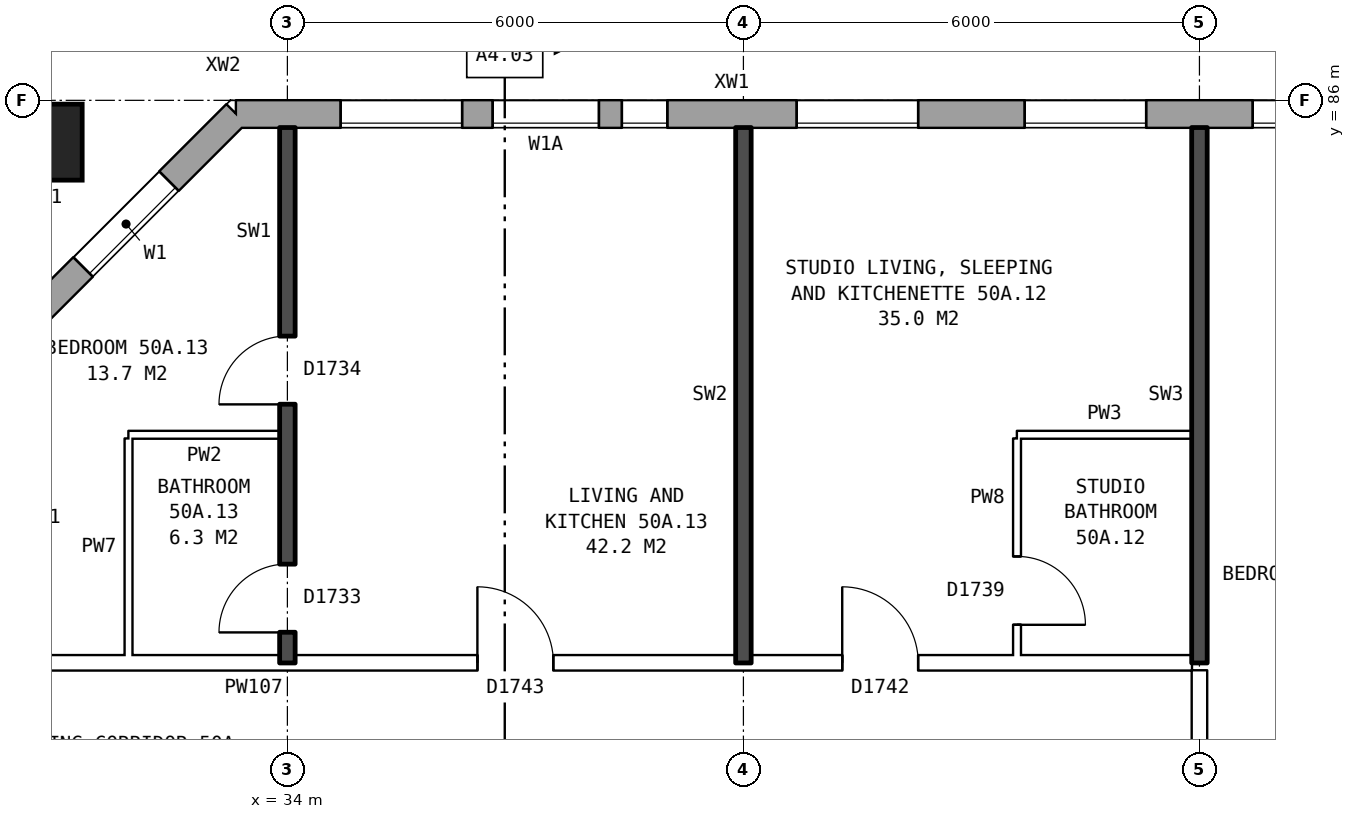
"""IFC4 building model, lengths in metres.
Left out: names, types, materials, properties, quantities, classifications, styles, units other than length and angle.
Written with IfcOpenShell. Run it as: python <this file> out.ifc"""

import sys

from ifc_helpers import new_model, si_unit, direction, frame, frame_2d, origin, origin_2d, place, context, subcontext, project, spatial, rectangle, hollow_rectangle, extrude, element, fill, save


model = new_model("IFC4")
c1 = context("Model", 3, precision=1e-05, world=origin(), true_north=direction((0.0, 1.0)))
c2 = subcontext(c1, "Body", "Model", "MODEL_VIEW")
j1 = project(units=[si_unit("LENGTHUNIT", "METRE"), si_unit("PLANEANGLEUNIT", "RADIAN")], contexts=[c1])
p1 = place(None, origin())
s1 = spatial("IfcSite", under=j1, at=p1, CompositionType="ELEMENT")
p2 = place(p1, origin())
s2 = spatial("IfcBuilding", under=s1, at=p2, CompositionType="ELEMENT")
p3 = place(p2, frame((0.0, 0.0, 178.9)))
s3 = spatial("IfcBuildingStorey", under=s2, at=p3, CompositionType="ELEMENT", Elevation=178.9)
p4 = place(p3, frame((30.8, 85.45, 0.0), z_axis=(0.0, 0.0, 1.0), x_axis=(1.0, 0.0, 0.0)))
e1 = element("IfcColumn", 1, at=p4, inside=s3, PredefinedType="COLUMN", context=c2, shape_type="SweptSolid", body=[
    extrude(hollow_rectangle(XDim=1.0, YDim=1.0, WallThickness=0.055, at=origin_2d()), origin(), (0.0, 0.0, 1.0), 3.1),
])
p5 = place(p3, frame((72.925, 85.82, 0.0), z_axis=(0.0, 0.0, 1.0), x_axis=(-1.0, 0.0, 0.0)))
e2 = element("IfcWall", 2, at=p5, inside=s3, PredefinedType="STANDARD", context=c2, shape_type="SweptSolid", body=[
    extrude(rectangle(XDim=39.601, YDim=0.36, at=frame_2d((19.8, 0.0))), origin(), (0.0, 0.0, 1.0), 2.85),
])
p6 = place(p5, frame((0.625, 0.0, 0.8)))
e3 = element("IfcOpeningElement", 3, at=p6, cuts=e2, PredefinedType="OPENING", context=c2, shape_type="SweptSolid", body=[
    extrude(rectangle(XDim=1.6, YDim=1.8, at=frame_2d((0.8, 0.9))), frame((0.0, 0.19, 0.0), z_axis=(0.0, -1.0, 0.0), x_axis=(1.0, 0.0, 0.0)), (0.0, 0.0, 1.0), 0.38),
])
p7 = place(p5, frame((3.125, 0.0, 0.8)))
e4 = element("IfcOpeningElement", 4, at=p7, cuts=e2, PredefinedType="OPENING", context=c2, shape_type="SweptSolid", body=[
    extrude(rectangle(XDim=1.6, YDim=1.8, at=frame_2d((0.8, 0.9))), frame((0.0, 0.19, 0.0), z_axis=(0.0, -1.0, 0.0), x_axis=(1.0, 0.0, 0.0)), (0.0, 0.0, 1.0), 0.38),
])
p8 = place(p5, frame((5.025, 0.0, 1.7)))
e5 = element("IfcOpeningElement", 5, at=p8, cuts=e2, PredefinedType="OPENING", context=c2, shape_type="SweptSolid", body=[
    extrude(rectangle(XDim=0.6, YDim=0.9, at=frame_2d((0.3, 0.45))), frame((0.0, 0.19, 0.0), z_axis=(0.0, -1.0, 0.0), x_axis=(1.0, 0.0, 0.0)), (0.0, 0.0, 1.0), 0.38),
])
p9 = place(p5, frame((9.625, 0.0, 0.8)))
e6 = element("IfcOpeningElement", 6, at=p9, cuts=e2, PredefinedType="OPENING", context=c2, shape_type="SweptSolid", body=[
    extrude(rectangle(XDim=1.6, YDim=1.8, at=frame_2d((0.8, 0.9))), frame((0.0, 0.19, 0.0), z_axis=(0.0, -1.0, 0.0), x_axis=(1.0, 0.0, 0.0)), (0.0, 0.0, 1.0), 0.38),
])
p10 = place(p5, frame((12.625, 0.0, 0.8)))
e7 = element("IfcOpeningElement", 7, at=p10, cuts=e2, PredefinedType="OPENING", context=c2, shape_type="SweptSolid", body=[
    extrude(rectangle(XDim=1.6, YDim=1.8, at=frame_2d((0.8, 0.9))), frame((0.0, 0.19, 0.0), z_axis=(0.0, -1.0, 0.0), x_axis=(1.0, 0.0, 0.0)), (0.0, 0.0, 1.0), 0.38),
])
p11 = place(p5, frame((15.625, 0.0, 0.8)))
e8 = element("IfcOpeningElement", 8, at=p11, cuts=e2, PredefinedType="OPENING", context=c2, shape_type="SweptSolid", body=[
    extrude(rectangle(XDim=1.6, YDim=1.8, at=frame_2d((0.8, 0.9))), frame((0.0, 0.19, 0.0), z_axis=(0.0, -1.0, 0.0), x_axis=(1.0, 0.0, 0.0)), (0.0, 0.0, 1.0), 0.38),
])
p12 = place(p5, frame((18.625, 0.0, 0.8)))
e9 = element("IfcOpeningElement", 9, at=p12, cuts=e2, PredefinedType="OPENING", context=c2, shape_type="SweptSolid", body=[
    extrude(rectangle(XDim=1.6, YDim=1.8, at=frame_2d((0.8, 0.9))), frame((0.0, 0.19, 0.0), z_axis=(0.0, -1.0, 0.0), x_axis=(1.0, 0.0, 0.0)), (0.0, 0.0, 1.0), 0.38),
])
p13 = place(p5, frame((21.625, 0.0, 0.8)))
e10 = element("IfcOpeningElement", 10, at=p13, cuts=e2, PredefinedType="OPENING", context=c2, shape_type="SweptSolid", body=[
    extrude(rectangle(XDim=1.6, YDim=1.8, at=frame_2d((0.8, 0.9))), frame((0.0, 0.19, 0.0), z_axis=(0.0, -1.0, 0.0), x_axis=(1.0, 0.0, 0.0)), (0.0, 0.0, 1.0), 0.38),
])
p14 = place(p5, frame((24.625, 0.0, 0.8)))
e11 = element("IfcOpeningElement", 11, at=p14, cuts=e2, PredefinedType="OPENING", context=c2, shape_type="SweptSolid", body=[
    extrude(rectangle(XDim=1.6, YDim=1.8, at=frame_2d((0.8, 0.9))), frame((0.0, 0.19, 0.0), z_axis=(0.0, -1.0, 0.0), x_axis=(1.0, 0.0, 0.0)), (0.0, 0.0, 1.0), 0.38),
])
p15 = place(p5, frame((27.625, 0.0, 0.8)))
e12 = element("IfcOpeningElement", 12, at=p15, cuts=e2, PredefinedType="OPENING", context=c2, shape_type="SweptSolid", body=[
    extrude(rectangle(XDim=1.6, YDim=1.8, at=frame_2d((0.8, 0.9))), frame((0.0, 0.19, 0.0), z_axis=(0.0, -1.0, 0.0), x_axis=(1.0, 0.0, 0.0)), (0.0, 0.0, 1.0), 0.38),
])
p16 = place(p5, frame((30.625, 0.0, 0.8)))
e13 = element("IfcOpeningElement", 13, at=p16, cuts=e2, PredefinedType="OPENING", context=c2, shape_type="SweptSolid", body=[
    extrude(rectangle(XDim=1.6, YDim=1.8, at=frame_2d((0.8, 0.9))), frame((0.0, 0.19, 0.0), z_axis=(0.0, -1.0, 0.0), x_axis=(1.0, 0.0, 0.0)), (0.0, 0.0, 1.0), 0.38),
])
p17 = place(p5, frame((33.925, 0.0, 1.7)))
e14 = element("IfcOpeningElement", 14, at=p17, cuts=e2, PredefinedType="OPENING", context=c2, shape_type="SweptSolid", body=[
    extrude(rectangle(XDim=0.6, YDim=0.9, at=frame_2d((0.3, 0.45))), frame((0.0, 0.19, 0.0), z_axis=(0.0, -1.0, 0.0), x_axis=(1.0, 0.0, 0.0)), (0.0, 0.0, 1.0), 0.38),
])
p18 = place(p5, frame((36.625, 0.0, 0.8)))
e15 = element("IfcOpeningElement", 15, at=p18, cuts=e2, PredefinedType="OPENING", context=c2, shape_type="SweptSolid", body=[
    extrude(rectangle(XDim=1.6, YDim=1.8, at=frame_2d((0.8, 0.9))), frame((0.0, 0.19, 0.0), z_axis=(0.0, -1.0, 0.0), x_axis=(1.0, 0.0, 0.0)), (0.0, 0.0, 1.0), 0.38),
])
p19 = place(p5, frame((6.825, 0.0, 0.8)))
e16 = element("IfcOpeningElement", 16, at=p19, cuts=e2, PredefinedType="OPENING", context=c2, shape_type="SweptSolid", body=[
    extrude(rectangle(XDim=0.6, YDim=0.9, at=frame_2d((0.3, 0.45))), frame((0.0, 0.19, 0.0), z_axis=(0.0, -1.0, 0.0), x_axis=(1.0, 0.0, 0.0)), (0.0, 0.0, 1.0), 0.38),
])
p20 = place(p5, frame((7.725, 0.0, 0.8)))
e17 = element("IfcOpeningElement", 17, at=p20, cuts=e2, PredefinedType="OPENING", context=c2, shape_type="SweptSolid", body=[
    extrude(rectangle(XDim=1.0, YDim=1.8, at=frame_2d((0.5, 0.9))), frame((0.0, 0.19, 0.0), z_axis=(0.0, -1.0, 0.0), x_axis=(1.0, 0.0, 0.0)), (0.0, 0.0, 1.0), 0.38),
])
p21 = place(p5, frame((34.825, 0.0, 0.8)))
e18 = element("IfcOpeningElement", 18, at=p21, cuts=e2, PredefinedType="OPENING", context=c2, shape_type="SweptSolid", body=[
    extrude(rectangle(XDim=1.4, YDim=1.8, at=frame_2d((0.7, 0.9))), frame((0.0, 0.19, 0.0), z_axis=(0.0, -1.0, 0.0), x_axis=(1.0, 0.0, 0.0)), (0.0, 0.0, 1.0), 0.38),
])
p22 = place(p3, frame((33.325, 85.82, 0.0), z_axis=(0.0, 0.0, 1.0), x_axis=(-0.707106781187, -0.707106781187, 0.0)))
e19 = element("IfcWall", 19, at=p22, inside=s3, PredefinedType="STANDARD", context=c2, shape_type="SweptSolid", body=[
    extrude(rectangle(XDim=4.094, YDim=0.36, at=frame_2d((2.047, 0.0))), origin(), (0.0, 0.0, 1.0), 2.85),
])
p23 = place(p22, frame((1.247, 0.0, 0.8)))
e20 = element("IfcOpeningElement", 20, at=p23, cuts=e19, PredefinedType="OPENING", context=c2, shape_type="SweptSolid", body=[
    extrude(rectangle(XDim=1.6, YDim=1.8, at=frame_2d((0.8, 0.9))), frame((0.0, 0.19, 0.0), z_axis=(0.0, -1.0, 0.0), x_axis=(1.0, 0.0, 0.0)), (0.0, 0.0, 1.0), 0.38),
])
p24 = place(p3, frame((30.61, 78.6, 0.0), z_axis=(0.0, 0.0, 1.0), x_axis=(1.0, 0.0, 0.0)))
e21 = element("IfcWall", 21, at=p24, inside=s3, PredefinedType="PARTITIONING", context=c2, shape_type="SweptSolid", body=[
    extrude(rectangle(XDim=15.29, YDim=0.2, at=frame_2d((7.645, 0.0))), origin(), (0.0, 0.0, 1.0), 2.85),
])
p25 = place(p24, frame((10.69, 0.0, 0.0)))
e22 = element("IfcOpeningElement", 22, at=p25, cuts=e21, PredefinedType="OPENING", context=c2, shape_type="SweptSolid", body=[
    extrude(rectangle(XDim=1.0, YDim=2.1, at=frame_2d((0.5, 1.05))), frame((0.0, 0.11, 0.0), z_axis=(0.0, -1.0, 0.0), x_axis=(1.0, 0.0, 0.0)), (0.0, 0.0, 1.0), 0.22),
])
p26 = place(p24, frame((5.89, 0.0, 0.0)))
e23 = element("IfcOpeningElement", 23, at=p26, cuts=e21, PredefinedType="OPENING", context=c2, shape_type="SweptSolid", body=[
    extrude(rectangle(XDim=1.0, YDim=2.1, at=frame_2d((0.5, 1.05))), frame((0.0, 0.11, 0.0), z_axis=(0.0, -1.0, 0.0), x_axis=(1.0, 0.0, 0.0)), (0.0, 0.0, 1.0), 0.22),
])
p27 = place(p3, frame((31.91, 81.6, 0.0), z_axis=(0.0, 0.0, 1.0), x_axis=(1.0, 0.0, 0.0)))
e24 = element("IfcWall", 24, at=p27, inside=s3, PredefinedType="PARTITIONING", context=c2, shape_type="SweptSolid", body=[
    extrude(rectangle(XDim=1.99, YDim=0.1, at=frame_2d((0.995, 0.0))), origin(), (0.0, 0.0, 1.0), 2.85),
])
p28 = place(p3, frame((43.6, 81.6, 0.0), z_axis=(0.0, 0.0, 1.0), x_axis=(1.0, 0.0, 0.0)))
e25 = element("IfcWall", 25, at=p28, inside=s3, PredefinedType="PARTITIONING", context=c2, shape_type="SweptSolid", body=[
    extrude(rectangle(XDim=2.3, YDim=0.1, at=frame_2d((1.15, 0.0))), origin(), (0.0, 0.0, 1.0), 2.85),
])
p29 = place(p3, frame((31.91, 78.7, 0.0), z_axis=(0.0, 0.0, 1.0), x_axis=(0.0, 1.0, 0.0)))
e26 = element("IfcWall", 26, at=p29, inside=s3, PredefinedType="PARTITIONING", context=c2, shape_type="SweptSolid", body=[
    extrude(rectangle(XDim=2.85, YDim=0.1, at=frame_2d((1.425, 0.0))), origin(), (0.0, 0.0, 1.0), 2.85),
])
p30 = place(p3, frame((34.0, 78.6, 0.0), z_axis=(0.0, 0.0, 1.0), x_axis=(0.0, 1.0, 0.0)))
e27 = element("IfcWall", 27, at=p30, inside=s3, PredefinedType="SOLIDWALL", context=c2, shape_type="SweptSolid", body=[
    extrude(rectangle(XDim=7.04, YDim=0.2, at=frame_2d((3.52, 0.0))), origin(), (0.0, 0.0, 1.0), 2.85),
])
p31 = place(p30, frame((3.4, 0.0, 0.0)))
e28 = element("IfcOpeningElement", 28, at=p31, cuts=e27, PredefinedType="OPENING", context=c2, shape_type="SweptSolid", body=[
    extrude(rectangle(XDim=0.9, YDim=2.1, at=frame_2d((0.45, 1.05))), frame((0.0, 0.11, 0.0), z_axis=(0.0, -1.0, 0.0), x_axis=(1.0, 0.0, 0.0)), (0.0, 0.0, 1.0), 0.22),
])
p32 = place(p30, frame((0.4, 0.0, 0.0)))
e29 = element("IfcOpeningElement", 29, at=p32, cuts=e27, PredefinedType="OPENING", context=c2, shape_type="SweptSolid", body=[
    extrude(rectangle(XDim=0.9, YDim=2.1, at=frame_2d((0.45, 1.05))), frame((0.0, 0.11, 0.0), z_axis=(0.0, -1.0, 0.0), x_axis=(1.0, 0.0, 0.0)), (0.0, 0.0, 1.0), 0.22),
])
p33 = place(p3, frame((40.0, 78.6, 0.0), z_axis=(0.0, 0.0, 1.0), x_axis=(0.0, 1.0, 0.0)))
e30 = element("IfcWall", 30, at=p33, inside=s3, PredefinedType="SOLIDWALL", context=c2, shape_type="SweptSolid", body=[
    extrude(rectangle(XDim=7.04, YDim=0.2, at=frame_2d((3.52, 0.0))), origin(), (0.0, 0.0, 1.0), 2.85),
])
p34 = place(p3, frame((43.6, 78.7, 0.0), z_axis=(0.0, 0.0, 1.0), x_axis=(0.0, 1.0, 0.0)))
e31 = element("IfcWall", 31, at=p34, inside=s3, PredefinedType="PARTITIONING", context=c2, shape_type="SweptSolid", body=[
    extrude(rectangle(XDim=2.85, YDim=0.1, at=frame_2d((1.425, 0.0))), origin(), (0.0, 0.0, 1.0), 2.85),
])
p35 = place(p34, frame((0.4, 0.0, 0.0)))
e32 = element("IfcOpeningElement", 32, at=p35, cuts=e31, PredefinedType="OPENING", context=c2, shape_type="SweptSolid", body=[
    extrude(rectangle(XDim=0.9, YDim=2.1, at=frame_2d((0.45, 1.05))), frame((0.0, 0.06, 0.0), z_axis=(0.0, -1.0, 0.0), x_axis=(1.0, 0.0, 0.0)), (0.0, 0.0, 1.0), 0.12),
])
p36 = place(p3, frame((46.0, 76.3, 0.0), z_axis=(0.0, 0.0, 1.0), x_axis=(0.0, 1.0, 0.0)))
e33 = element("IfcWall", 33, at=p36, inside=s3, PredefinedType="PARTITIONING", context=c2, shape_type="SweptSolid", body=[
    extrude(rectangle(XDim=2.2, YDim=0.2, at=frame_2d((1.1, 0.0))), origin(), (0.0, 0.0, 1.0), 2.85),
])
p37 = place(p3, frame((46.0, 78.6, 0.0), z_axis=(0.0, 0.0, 1.0), x_axis=(0.0, 1.0, 0.0)))
e34 = element("IfcWall", 34, at=p37, inside=s3, PredefinedType="SOLIDWALL", context=c2, shape_type="SweptSolid", body=[
    extrude(rectangle(XDim=7.04, YDim=0.2, at=frame_2d((3.52, 0.0))), origin(), (0.0, 0.0, 1.0), 2.85),
])
p38 = place(p14, origin())
e35 = element("IfcWindow", 35, at=p38, inside=s3, PartitioningType="SINGLE_PANEL", PredefinedType="WINDOW", context=c2, shape_type="SweptSolid", body=[
    extrude(rectangle(XDim=1.6, YDim=1.8, at=frame_2d((0.8, 0.9))), frame((0.0, 0.15, 0.0), z_axis=(0.0, -1.0, 0.0), x_axis=(1.0, 0.0, 0.0)), (0.0, 0.0, 1.0), 0.06),
])
fill(e11, e35)
p39 = place(p15, origin())
e36 = element("IfcWindow", 36, at=p39, inside=s3, PartitioningType="SINGLE_PANEL", PredefinedType="WINDOW", context=c2, shape_type="SweptSolid", body=[
    extrude(rectangle(XDim=1.6, YDim=1.8, at=frame_2d((0.8, 0.9))), frame((0.0, 0.15, 0.0), z_axis=(0.0, -1.0, 0.0), x_axis=(1.0, 0.0, 0.0)), (0.0, 0.0, 1.0), 0.06),
])
fill(e12, e36)
p40 = place(p16, origin())
e37 = element("IfcWindow", 37, at=p40, inside=s3, PartitioningType="SINGLE_PANEL", PredefinedType="WINDOW", context=c2, shape_type="SweptSolid", body=[
    extrude(rectangle(XDim=1.6, YDim=1.8, at=frame_2d((0.8, 0.9))), frame((0.0, 0.15, 0.0), z_axis=(0.0, -1.0, 0.0), x_axis=(1.0, 0.0, 0.0)), (0.0, 0.0, 1.0), 0.06),
])
fill(e13, e37)
p41 = place(p17, origin())
e38 = element("IfcWindow", 38, at=p41, inside=s3, PartitioningType="SINGLE_PANEL", PredefinedType="WINDOW", context=c2, shape_type="SweptSolid", body=[
    extrude(rectangle(XDim=0.6, YDim=0.9, at=frame_2d((0.3, 0.45))), frame((0.0, 0.15, 0.0), z_axis=(0.0, -1.0, 0.0), x_axis=(1.0, 0.0, 0.0)), (0.0, 0.0, 1.0), 0.06),
])
fill(e14, e38)
p42 = place(p18, origin())
e39 = element("IfcWindow", 39, at=p42, inside=s3, PartitioningType="SINGLE_PANEL", PredefinedType="WINDOW", context=c2, shape_type="SweptSolid", body=[
    extrude(rectangle(XDim=1.6, YDim=1.8, at=frame_2d((0.8, 0.9))), frame((0.0, 0.15, 0.0), z_axis=(0.0, -1.0, 0.0), x_axis=(1.0, 0.0, 0.0)), (0.0, 0.0, 1.0), 0.06),
])
fill(e15, e39)
p43 = place(p23, origin())
e40 = element("IfcWindow", 40, at=p43, inside=s3, PartitioningType="SINGLE_PANEL", PredefinedType="WINDOW", context=c2, shape_type="SweptSolid", body=[
    extrude(rectangle(XDim=1.6, YDim=1.8, at=frame_2d((0.8, 0.9))), frame((0.0, 0.15, 0.0), z_axis=(0.0, -1.0, 0.0), x_axis=(1.0, 0.0, 0.0)), (0.0, 0.0, 1.0), 0.06),
])
fill(e20, e40)
p44 = place(p25, origin())
e41 = element("IfcDoor", 41, at=p44, inside=s3, OperationType="SINGLE_SWING_LEFT", PredefinedType="DOOR", context=c2, shape_type="SweptSolid", body=[
    extrude(rectangle(XDim=1.0, YDim=2.1, at=frame_2d((0.5, 1.05))), frame((0.0, 0.025, 0.0), z_axis=(0.0, -1.0, 0.0), x_axis=(1.0, 0.0, 0.0)), (0.0, 0.0, 1.0), 0.05),
])
fill(e22, e41)
p45 = place(p35, frame((0.9, 0.0, 0.0), z_axis=(0.0, 0.0, 1.0), x_axis=(-1.0, 0.0, 0.0)))
e42 = element("IfcDoor", 42, at=p45, inside=s3, OperationType="SINGLE_SWING_RIGHT", PredefinedType="DOOR", context=c2, shape_type="SweptSolid", body=[
    extrude(rectangle(XDim=0.9, YDim=2.1, at=frame_2d((0.45, 1.05))), frame((0.0, 0.025, 0.0), z_axis=(0.0, -1.0, 0.0), x_axis=(1.0, 0.0, 0.0)), (0.0, 0.0, 1.0), 0.05),
])
fill(e32, e42)
p46 = place(p31, origin())
e43 = element("IfcDoor", 43, at=p46, inside=s3, OperationType="SINGLE_SWING_LEFT", PredefinedType="DOOR", context=c2, shape_type="SweptSolid", body=[
    extrude(rectangle(XDim=0.9, YDim=2.1, at=frame_2d((0.45, 1.05))), frame((0.0, 0.025, 0.0), z_axis=(0.0, -1.0, 0.0), x_axis=(1.0, 0.0, 0.0)), (0.0, 0.0, 1.0), 0.05),
])
fill(e28, e43)
p47 = place(p26, origin())
e44 = element("IfcDoor", 44, at=p47, inside=s3, OperationType="SINGLE_SWING_LEFT", PredefinedType="DOOR", context=c2, shape_type="SweptSolid", body=[
    extrude(rectangle(XDim=1.0, YDim=2.1, at=frame_2d((0.5, 1.05))), frame((0.0, 0.025, 0.0), z_axis=(0.0, -1.0, 0.0), x_axis=(1.0, 0.0, 0.0)), (0.0, 0.0, 1.0), 0.05),
])
fill(e23, e44)
p48 = place(p32, origin())
e45 = element("IfcDoor", 45, at=p48, inside=s3, OperationType="SINGLE_SWING_LEFT", PredefinedType="DOOR", context=c2, shape_type="SweptSolid", body=[
    extrude(rectangle(XDim=0.9, YDim=2.1, at=frame_2d((0.45, 1.05))), frame((0.0, 0.025, 0.0), z_axis=(0.0, -1.0, 0.0), x_axis=(1.0, 0.0, 0.0)), (0.0, 0.0, 1.0), 0.05),
])
fill(e29, e45)
p49 = place(p21, origin())
e46 = element("IfcWindow", 46, at=p49, inside=s3, PartitioningType="SINGLE_PANEL", PredefinedType="WINDOW", context=c2, shape_type="SweptSolid", body=[
    extrude(rectangle(XDim=1.4, YDim=1.8, at=frame_2d((0.7, 0.9))), frame((0.0, 0.15, 0.0), z_axis=(0.0, -1.0, 0.0), x_axis=(1.0, 0.0, 0.0)), (0.0, 0.0, 1.0), 0.06),
])
fill(e18, e46)
save(model, sys.argv[1])
